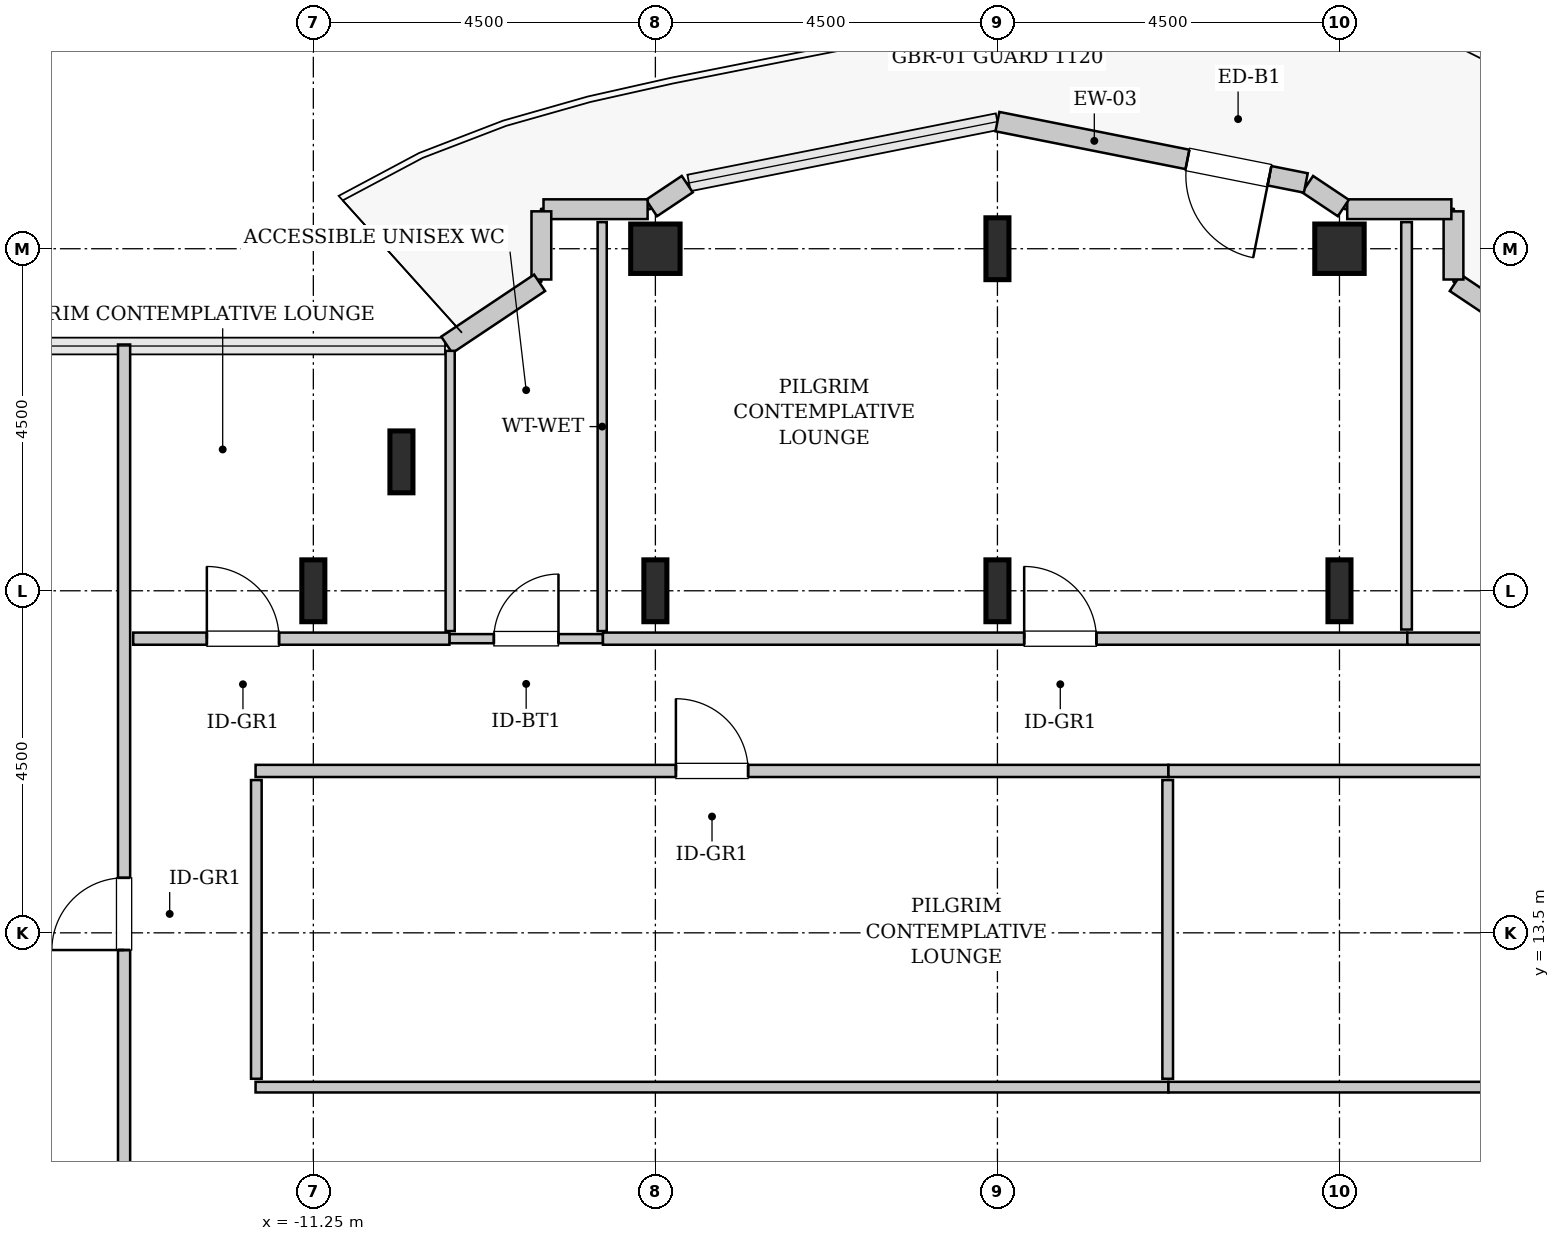
"""IFC4 building model, lengths in metres.
Left out: names, types, materials, properties, quantities, classifications, styles, units other than length and angle.
Written with IfcOpenShell. Run it as: python <this file> out.ifc"""

import sys

from ifc_helpers import new_model, si_unit, direction, frame, frame_2d, origin, origin_2d, place, context, subcontext, project, spatial, rectangle, hollow_rectangle, i_section, extrude, source, transform, mapped, element, fill, save


model = new_model("IFC4")
c1 = context("Model", 3, precision=1e-05, world=origin(), true_north=direction((0.0, 1.0)))
c2 = subcontext(c1, "Body", "Model", "MODEL_VIEW")
j1 = project(units=[si_unit("LENGTHUNIT", "METRE"), si_unit("PLANEANGLEUNIT", "RADIAN")], contexts=[c1])
p1 = place(None, origin())
s1 = spatial("IfcSite", under=j1, at=p1, CompositionType="ELEMENT")
p2 = place(p1, origin())
s2 = spatial("IfcBuilding", under=s1, at=p2, CompositionType="ELEMENT")
p3 = place(p2, frame((0.0, 0.0, 218.0)))
s3 = spatial("IfcBuildingStorey", under=s2, at=p3, CompositionType="ELEMENT", Elevation=218.0)
m1 = source(origin(), c2, "Body", "SweptSolid", [
    extrude(i_section(OverallWidth=0.303, OverallDepth=0.814, WebThickness=0.021, FlangeThickness=0.04, FilletRadius=0.03, at=origin_2d()), origin(), (0.0, 0.0, 1.0), 3.8),
])
for number, where, z_axis, x_axis in (
    (1, (-11.25, 18.0, 0.0), (0.0, 0.0, 1.0), (1.0, 0.0, 0.0)),
    (2, (-10.091, 19.696, 0.0), (0.0, 0.0, 1.0), (1.0, 0.0, 0.0)),
    (3, (-6.75, 18.0, 0.0), (0.0, 0.0, 1.0), (1.0, 0.0, 0.0)),
):
    element("IfcColumn", number, at=place(p3, frame(where, z_axis=z_axis, x_axis=x_axis)), inside=s3, PredefinedType="COLUMN", context=c2, shape_type="MappedRepresentation", body=[
        mapped(m1, transform((0.0, 0.0, 0.0), x_axis=(1.0, 0.0, 0.0), y_axis=(0.0, 1.0, 0.0), z_axis=(0.0, 0.0, 1.0), scale=1.0)),
    ])
m2 = source(origin(), c2, "Body", "SweptSolid", [
    extrude(hollow_rectangle(XDim=0.65, YDim=0.65, WallThickness=0.032, InnerFilletRadius=0.032, OuterFilletRadius=0.064, at=origin_2d()), origin(), (0.0, 0.0, 1.0), 3.8),
])
p4 = place(p3, frame((-6.75, 22.5, 0.0), z_axis=(0.0, 0.0, 1.0), x_axis=(1.0, 0.0, 0.0)))
e4 = element("IfcColumn", 4, at=p4, inside=s3, PredefinedType="COLUMN", context=c2, shape_type="MappedRepresentation", body=[
    mapped(m2, transform((0.0, 0.0, 0.0), x_axis=(1.0, 0.0, 0.0), y_axis=(0.0, 1.0, 0.0), z_axis=(0.0, 0.0, 1.0), scale=1.0)),
])
for number, where, z_axis, x_axis in (
    (5, (-2.25, 18.0, 0.0), (0.0, 0.0, 1.0), (1.0, 0.0, 0.0)),
    (6, (-2.25, 22.5, 0.0), (0.0, 0.0, 1.0), (1.0, 0.0, 0.0)),
    (7, (2.25, 18.0, 0.0), (0.0, 0.0, 1.0), (1.0, 0.0, 0.0)),
):
    element("IfcColumn", number, at=place(p3, frame(where, z_axis=z_axis, x_axis=x_axis)), inside=s3, PredefinedType="COLUMN", context=c2, shape_type="MappedRepresentation", body=[
        mapped(m1, transform((0.0, 0.0, 0.0), x_axis=(1.0, 0.0, 0.0), y_axis=(0.0, 1.0, 0.0), z_axis=(0.0, 0.0, 1.0), scale=1.0)),
    ])
p5 = place(p3, frame((2.25, 22.5, 0.0), z_axis=(0.0, 0.0, 1.0), x_axis=(1.0, 0.0, 0.0)))
e8 = element("IfcColumn", 8, at=p5, inside=s3, PredefinedType="COLUMN", context=c2, shape_type="MappedRepresentation", body=[
    mapped(m2, transform((0.0, 0.0, 0.0), x_axis=(1.0, 0.0, 0.0), y_axis=(0.0, 1.0, 0.0), z_axis=(0.0, 0.0, 1.0), scale=1.0)),
])
m3 = source(origin(), c2, "Body", "SweptSolid", [
    extrude(rectangle(XDim=1.469, YDim=0.26, at=frame_2d((0.734, 0.0))), origin(), (0.0, 0.0, 1.0), 3.55),
])
p6 = place(p3, frame((4.995, 21.236, 0.0), z_axis=(0.0, 0.0, 1.0), x_axis=(-0.831461760506, 0.555581983884, 0.0)))
e9 = element("IfcWall", 9, at=p6, inside=s3, PredefinedType="SOLIDWALL", context=c2, shape_type="MappedRepresentation", body=[
    mapped(m3, transform((0.0, 0.0, 0.0), x_axis=(1.0, 0.0, 0.0), y_axis=(0.0, 1.0, 0.0), z_axis=(0.0, 0.0, 1.0), scale=1.0)),
])
m4 = source(origin(), c2, "Body", "SweptSolid", [
    extrude(rectangle(XDim=0.897, YDim=0.26, at=frame_2d((0.448, 0.0))), origin(), (0.0, 0.0, 1.0), 3.55),
])
p7 = place(p3, frame((3.75, 22.095, 0.0), z_axis=(0.0, 0.0, 1.0), x_axis=(0.0, 1.0, 0.0)))
e10 = element("IfcWall", 10, at=p7, inside=s3, PredefinedType="SOLIDWALL", context=c2, shape_type="MappedRepresentation", body=[
    mapped(m4, transform((0.0, 0.0, 0.0), x_axis=(1.0, 0.0, 0.0), y_axis=(0.0, 1.0, 0.0), z_axis=(0.0, 0.0, 1.0), scale=1.0)),
])
m5 = source(origin(), c2, "Body", "SweptSolid", [
    extrude(rectangle(XDim=1.37, YDim=0.26, at=frame_2d((0.685, 0.0))), origin(), (0.0, 0.0, 1.0), 3.55),
])
p8 = place(p3, frame((3.722, 23.02, 0.0), z_axis=(0.0, 0.0, 1.0), x_axis=(-1.0, 0.0, 0.0)))
e11 = element("IfcWall", 11, at=p8, inside=s3, PredefinedType="SOLIDWALL", context=c2, shape_type="MappedRepresentation", body=[
    mapped(m5, transform((0.0, 0.0, 0.0), x_axis=(1.0, 0.0, 0.0), y_axis=(0.0, 1.0, 0.0), z_axis=(0.0, 0.0, 1.0), scale=1.0)),
])
m6 = source(origin(), c2, "Body", "SweptSolid", [
    extrude(rectangle(XDim=0.565, YDim=0.26, at=frame_2d((0.283, 0.0))), origin(), (0.0, 0.0, 1.0), 3.55),
])
p9 = place(p3, frame((2.301, 23.036, 0.0), z_axis=(0.0, 0.0, 1.0), x_axis=(-0.831651492666, 0.555297933317, 0.0)))
e12 = element("IfcWall", 12, at=p9, inside=s3, PredefinedType="SOLIDWALL", context=c2, shape_type="MappedRepresentation", body=[
    mapped(m6, transform((0.0, 0.0, 0.0), x_axis=(1.0, 0.0, 0.0), y_axis=(0.0, 1.0, 0.0), z_axis=(0.0, 0.0, 1.0), scale=1.0)),
])
m7 = source(origin(), c2, "Body", "SweptSolid", [
    extrude(rectangle(XDim=4.137, YDim=0.26, at=frame_2d((2.068, 0.0))), origin(), (0.0, 0.0, 1.0), 3.55),
])
p10 = place(p3, frame((1.807, 23.365, 0.0), z_axis=(0.0, 0.0, 1.0), x_axis=(-0.980782170794, 0.195105954428, 0.0)))
e13 = element("IfcWall", 13, at=p10, inside=s3, PredefinedType="SOLIDWALL", context=c2, shape_type="MappedRepresentation", body=[
    mapped(m7, transform((0.0, 0.0, 0.0), x_axis=(1.0, 0.0, 0.0), y_axis=(0.0, 1.0, 0.0), z_axis=(0.0, 0.0, 1.0), scale=1.0)),
])
p11 = place(p10, frame((0.488, 0.0, 0.0)))
e14 = element("IfcOpeningElement", 14, at=p11, cuts=e13, PredefinedType="OPENING", context=c2, shape_type="SweptSolid", body=[
    extrude(rectangle(XDim=1.1, YDim=2.2, at=frame_2d((0.55, 1.1))), frame((0.0, 0.14, 0.0), z_axis=(0.0, -1.0, 0.0), x_axis=(1.0, 0.0, 0.0)), (0.0, 0.0, 1.0), 0.28),
])
p12 = place(p3, frame((-6.331, 23.35, 0.0), z_axis=(0.0, 0.0, 1.0), x_axis=(-0.831651492666, -0.555297933317, 0.0)))
e15 = element("IfcWall", 15, at=p12, inside=s3, PredefinedType="SOLIDWALL", context=c2, shape_type="MappedRepresentation", body=[
    mapped(m6, transform((0.0, 0.0, 0.0), x_axis=(1.0, 0.0, 0.0), y_axis=(0.0, 1.0, 0.0), z_axis=(0.0, 0.0, 1.0), scale=1.0)),
])
p13 = place(p3, frame((-6.852, 23.02, 0.0), z_axis=(0.0, 0.0, 1.0), x_axis=(-1.0, 0.0, 0.0)))
e16 = element("IfcWall", 16, at=p13, inside=s3, PredefinedType="SOLIDWALL", context=c2, shape_type="MappedRepresentation", body=[
    mapped(m5, transform((0.0, 0.0, 0.0), x_axis=(1.0, 0.0, 0.0), y_axis=(0.0, 1.0, 0.0), z_axis=(0.0, 0.0, 1.0), scale=1.0)),
])
p14 = place(p3, frame((-8.25, 22.992, 0.0), z_axis=(0.0, 0.0, 1.0), x_axis=(0.0, -1.0, 0.0)))
e17 = element("IfcWall", 17, at=p14, inside=s3, PredefinedType="SOLIDWALL", context=c2, shape_type="MappedRepresentation", body=[
    mapped(m4, transform((0.0, 0.0, 0.0), x_axis=(1.0, 0.0, 0.0), y_axis=(0.0, 1.0, 0.0), z_axis=(0.0, 0.0, 1.0), scale=1.0)),
])
p15 = place(p3, frame((-8.273, 22.052, 0.0), z_axis=(0.0, 0.0, 1.0), x_axis=(-0.831461760506, -0.555581983884, 0.0)))
e18 = element("IfcWall", 18, at=p15, inside=s3, PredefinedType="SOLIDWALL", context=c2, shape_type="MappedRepresentation", body=[
    mapped(m3, transform((0.0, 0.0, 0.0), x_axis=(1.0, 0.0, 0.0), y_axis=(0.0, 1.0, 0.0), z_axis=(0.0, 0.0, 1.0), scale=1.0)),
])
m8 = source(origin(), c2, "Body", "SweptSolid", [
    extrude(rectangle(XDim=2.02, YDim=0.12, at=frame_2d((1.01, 0.0))), origin(), (0.0, 0.0, 1.0), 3.535),
])
p16 = place(p3, frame((-9.46, 17.37, 0.0), z_axis=(0.0, 0.0, 1.0), x_axis=(1.0, 0.0, 0.0)))
e19 = element("IfcWall", 19, at=p16, inside=s3, PredefinedType="PLUMBINGWALL", context=c2, shape_type="MappedRepresentation", body=[
    mapped(m8, transform((0.0, 0.0, 0.0), x_axis=(1.0, 0.0, 0.0), y_axis=(0.0, 1.0, 0.0), z_axis=(0.0, 0.0, 1.0), scale=1.0)),
])
p17 = place(p16, frame((0.585, 0.0, 0.0)))
e20 = element("IfcOpeningElement", 20, at=p17, cuts=e19, PredefinedType="OPENING", context=c2, shape_type="SweptSolid", body=[
    extrude(rectangle(XDim=0.85, YDim=2.1, at=frame_2d((0.425, 1.05))), frame((0.0, 0.07, 0.0), z_axis=(0.0, -1.0, 0.0), x_axis=(1.0, 0.0, 0.0)), (0.0, 0.0, 1.0), 0.14),
])
m9 = source(origin(), c2, "Body", "SweptSolid", [
    extrude(rectangle(XDim=5.38, YDim=0.12, at=frame_2d((2.69, 0.0))), origin(), (0.0, 0.0, 1.0), 3.535),
])
p18 = place(p3, frame((-7.45, 17.47, 0.0), z_axis=(0.0, 0.0, 1.0), x_axis=(0.0, 1.0, 0.0)))
e21 = element("IfcWall", 21, at=p18, inside=s3, PredefinedType="PLUMBINGWALL", context=c2, shape_type="MappedRepresentation", body=[
    mapped(m9, transform((0.0, 0.0, 0.0), x_axis=(1.0, 0.0, 0.0), y_axis=(0.0, 1.0, 0.0), z_axis=(0.0, 0.0, 1.0), scale=1.0)),
])
m10 = source(origin(), c2, "Body", "SweptSolid", [
    extrude(rectangle(XDim=3.687, YDim=0.12, at=frame_2d((1.843, 0.0))), origin(), (0.0, 0.0, 1.0), 3.535),
])
p19 = place(p3, frame((-9.45, 17.47, 0.0), z_axis=(0.0, 0.0, 1.0), x_axis=(0.0, 1.0, 0.0)))
e22 = element("IfcWall", 22, at=p19, inside=s3, PredefinedType="PLUMBINGWALL", context=c2, shape_type="MappedRepresentation", body=[
    mapped(m10, transform((0.0, 0.0, 0.0), x_axis=(1.0, 0.0, 0.0), y_axis=(0.0, 1.0, 0.0), z_axis=(0.0, 0.0, 1.0), scale=1.0)),
])
m11 = source(origin(), c2, "Body", "SweptSolid", [
    extrude(rectangle(XDim=11.153, YDim=0.16, at=frame_2d((5.576, 0.0))), origin(), (0.0, 0.0, 1.0), 3.535),
])
p20 = place(p3, frame((-13.74, 10.087, 0.0), z_axis=(0.0, 0.0, 1.0), x_axis=(0.0, 1.0, 0.0)))
e23 = element("IfcWall", 23, at=p20, inside=s3, PredefinedType="PARTITIONING", context=c2, shape_type="MappedRepresentation", body=[
    mapped(m11, transform((0.0, 0.0, 0.0), x_axis=(1.0, 0.0, 0.0), y_axis=(0.0, 1.0, 0.0), z_axis=(0.0, 0.0, 1.0), scale=1.0)),
])
p21 = place(p20, frame((3.186, 0.0, 0.0)))
e24 = element("IfcOpeningElement", 24, at=p21, cuts=e23, PredefinedType="OPENING", context=c2, shape_type="SweptSolid", body=[
    extrude(rectangle(XDim=0.95, YDim=2.1, at=frame_2d((0.475, 1.05))), frame((0.0, 0.09, 0.0), z_axis=(0.0, -1.0, 0.0), x_axis=(1.0, 0.0, 0.0)), (0.0, 0.0, 1.0), 0.18),
])
m12 = source(origin(), c2, "Body", "SweptSolid", [
    extrude(rectangle(XDim=10.583, YDim=0.16, at=frame_2d((5.291, 0.0))), origin(), (0.0, 0.0, 1.0), 3.535),
])
p22 = place(p3, frame((-7.44, 17.37, 0.0), z_axis=(0.0, 0.0, 1.0), x_axis=(1.0, 0.0, 0.0)))
e25 = element("IfcWall", 25, at=p22, inside=s3, PredefinedType="PARTITIONING", context=c2, shape_type="MappedRepresentation", body=[
    mapped(m12, transform((0.0, 0.0, 0.0), x_axis=(1.0, 0.0, 0.0), y_axis=(0.0, 1.0, 0.0), z_axis=(0.0, 0.0, 1.0), scale=1.0)),
])
p23 = place(p22, frame((5.542, 0.0, 0.0)))
e26 = element("IfcOpeningElement", 26, at=p23, cuts=e25, PredefinedType="OPENING", context=c2, shape_type="SweptSolid", body=[
    extrude(rectangle(XDim=0.95, YDim=2.1, at=frame_2d((0.475, 1.05))), frame((0.0, 0.09, 0.0), z_axis=(0.0, -1.0, 0.0), x_axis=(1.0, 0.0, 0.0)), (0.0, 0.0, 1.0), 0.18),
])
m13 = source(origin(), c2, "Body", "SweptSolid", [
    extrude(rectangle(XDim=5.36, YDim=0.14, at=frame_2d((2.68, 0.0))), origin(), (0.0, 0.0, 1.0), 3.535),
])
p24 = place(p3, frame((3.133, 17.49, 0.0), z_axis=(0.0, 0.0, 1.0), x_axis=(0.0, 1.0, 0.0)))
e27 = element("IfcWall", 27, at=p24, inside=s3, PredefinedType="PARTITIONING", context=c2, shape_type="MappedRepresentation", body=[
    mapped(m13, transform((0.0, 0.0, 0.0), x_axis=(1.0, 0.0, 0.0), y_axis=(0.0, 1.0, 0.0), z_axis=(0.0, 0.0, 1.0), scale=1.0)),
])
m14 = source(origin(), c2, "Body", "SweptSolid", [
    extrude(rectangle(XDim=10.478, YDim=0.16, at=frame_2d((5.239, 0.0))), origin(), (0.0, 0.0, 1.0), 3.535),
])
p25 = place(p3, frame((3.143, 17.37, 0.0), z_axis=(0.0, 0.0, 1.0), x_axis=(1.0, 0.0, 0.0)))
e28 = element("IfcWall", 28, at=p25, inside=s3, PredefinedType="PARTITIONING", context=c2, shape_type="MappedRepresentation", body=[
    mapped(m14, transform((0.0, 0.0, 0.0), x_axis=(1.0, 0.0, 0.0), y_axis=(0.0, 1.0, 0.0), z_axis=(0.0, 0.0, 1.0), scale=1.0)),
])
p26 = place(p25, frame((4.764, 0.0, 0.0)))
e29 = element("IfcOpeningElement", 29, at=p26, cuts=e28, PredefinedType="OPENING", context=c2, shape_type="SweptSolid", body=[
    extrude(rectangle(XDim=0.95, YDim=2.1, at=frame_2d((0.475, 1.05))), frame((0.0, 0.09, 0.0), z_axis=(0.0, -1.0, 0.0), x_axis=(1.0, 0.0, 0.0)), (0.0, 0.0, 1.0), 0.18),
])
m15 = source(origin(), c2, "Body", "SweptSolid", [
    extrude(rectangle(XDim=12.01, YDim=0.16, at=frame_2d((6.005, 0.0))), origin(), (0.0, 0.0, 1.0), 3.535),
])
p27 = place(p3, frame((-12.01, 15.63, 0.0), z_axis=(0.0, 0.0, 1.0), x_axis=(1.0, 0.0, 0.0)))
e30 = element("IfcWall", 30, at=p27, inside=s3, PredefinedType="PARTITIONING", context=c2, shape_type="MappedRepresentation", body=[
    mapped(m15, transform((0.0, 0.0, 0.0), x_axis=(1.0, 0.0, 0.0), y_axis=(0.0, 1.0, 0.0), z_axis=(0.0, 0.0, 1.0), scale=1.0)),
])
p28 = place(p27, frame((5.53, 0.0, 0.0)))
e31 = element("IfcOpeningElement", 31, at=p28, cuts=e30, PredefinedType="OPENING", context=c2, shape_type="SweptSolid", body=[
    extrude(rectangle(XDim=0.95, YDim=2.1, at=frame_2d((0.475, 1.05))), frame((0.0, 0.09, 0.0), z_axis=(0.0, -1.0, 0.0), x_axis=(1.0, 0.0, 0.0)), (0.0, 0.0, 1.0), 0.18),
])
m16 = source(origin(), c2, "Body", "SweptSolid", [
    extrude(rectangle(XDim=12.01, YDim=0.14, at=frame_2d((6.005, 0.0))), origin(), (0.0, 0.0, 1.0), 3.535),
])
p29 = place(p3, frame((-12.01, 11.47, 0.0), z_axis=(0.0, 0.0, 1.0), x_axis=(1.0, 0.0, 0.0)))
e32 = element("IfcWall", 32, at=p29, inside=s3, PredefinedType="PARTITIONING", context=c2, shape_type="MappedRepresentation", body=[
    mapped(m16, transform((0.0, 0.0, 0.0), x_axis=(1.0, 0.0, 0.0), y_axis=(0.0, 1.0, 0.0), z_axis=(0.0, 0.0, 1.0), scale=1.0)),
])
m17 = source(origin(), c2, "Body", "SweptSolid", [
    extrude(rectangle(XDim=3.93, YDim=0.14, at=frame_2d((1.965, 0.0))), origin(), (0.0, 0.0, 1.0), 3.535),
])
for number, where, z_axis, x_axis in (
    (33, (-12.0, 11.58, 0.0), (0.0, 0.0, 1.0), (0.0, 1.0, 0.0)),
    (34, (-0.01, 11.58, 0.0), (0.0, 0.0, 1.0), (0.0, 1.0, 0.0)),
):
    element("IfcWall", number, at=place(p3, frame(where, z_axis=z_axis, x_axis=x_axis)), inside=s3, PredefinedType="PARTITIONING", context=c2, shape_type="MappedRepresentation", body=[
        mapped(m17, transform((0.0, 0.0, 0.0), x_axis=(1.0, 0.0, 0.0), y_axis=(0.0, 1.0, 0.0), z_axis=(0.0, 0.0, 1.0), scale=1.0)),
    ])
p30 = place(p3, frame((0.0, 15.63, 0.0), z_axis=(0.0, 0.0, 1.0), x_axis=(1.0, 0.0, 0.0)))
e35 = element("IfcWall", 35, at=p30, inside=s3, PredefinedType="PARTITIONING", context=c2, shape_type="MappedRepresentation", body=[
    mapped(m15, transform((0.0, 0.0, 0.0), x_axis=(1.0, 0.0, 0.0), y_axis=(0.0, 1.0, 0.0), z_axis=(0.0, 0.0, 1.0), scale=1.0)),
])
p31 = place(p30, frame((5.53, 0.0, 0.0)))
e36 = element("IfcOpeningElement", 36, at=p31, cuts=e35, PredefinedType="OPENING", context=c2, shape_type="SweptSolid", body=[
    extrude(rectangle(XDim=0.95, YDim=2.1, at=frame_2d((0.475, 1.05))), frame((0.0, 0.09, 0.0), z_axis=(0.0, -1.0, 0.0), x_axis=(1.0, 0.0, 0.0)), (0.0, 0.0, 1.0), 0.18),
])
p32 = place(p3, frame((0.0, 11.47, 0.0), z_axis=(0.0, 0.0, 1.0), x_axis=(1.0, 0.0, 0.0)))
e37 = element("IfcWall", 37, at=p32, inside=s3, PredefinedType="PARTITIONING", context=c2, shape_type="MappedRepresentation", body=[
    mapped(m16, transform((0.0, 0.0, 0.0), x_axis=(1.0, 0.0, 0.0), y_axis=(0.0, 1.0, 0.0), z_axis=(0.0, 0.0, 1.0), scale=1.0)),
])
m18 = source(origin(), c2, "Body", "SweptSolid", [
    extrude(rectangle(XDim=4.16, YDim=0.16, at=frame_2d((2.08, 0.0))), origin(), (0.0, 0.0, 1.0), 3.535),
])
p33 = place(p3, frame((-13.62, 17.37, 0.0), z_axis=(0.0, 0.0, 1.0), x_axis=(1.0, 0.0, 0.0)))
e38 = element("IfcWall", 38, at=p33, inside=s3, PredefinedType="PARTITIONING", context=c2, shape_type="MappedRepresentation", body=[
    mapped(m18, transform((0.0, 0.0, 0.0), x_axis=(1.0, 0.0, 0.0), y_axis=(0.0, 1.0, 0.0), z_axis=(0.0, 0.0, 1.0), scale=1.0)),
])
p34 = place(p33, frame((0.969, 0.0, 0.0)))
e39 = element("IfcOpeningElement", 39, at=p34, cuts=e38, PredefinedType="OPENING", context=c2, shape_type="SweptSolid", body=[
    extrude(rectangle(XDim=0.95, YDim=2.1, at=frame_2d((0.475, 1.05))), frame((0.0, 0.09, 0.0), z_axis=(0.0, -1.0, 0.0), x_axis=(1.0, 0.0, 0.0)), (0.0, 0.0, 1.0), 0.18),
])
m19 = source(origin(), c2, "Body", "SweptSolid", [
    extrude(rectangle(XDim=1.1, YDim=2.2, at=frame_2d((0.55, 1.1))), frame((0.0, 0.025, 0.0), z_axis=(0.0, -1.0, 0.0), x_axis=(1.0, 0.0, 0.0)), (0.0, 0.0, 1.0), 0.05),
])
p35 = place(p11, origin())
e40 = element("IfcDoor", 40, at=p35, inside=s3, OperationType="SINGLE_SWING_LEFT", PredefinedType="DOOR", context=c2, shape_type="MappedRepresentation", body=[
    mapped(m19, transform((0.0, 0.0, 0.0), x_axis=(1.0, 0.0, 0.0), y_axis=(0.0, 1.0, 0.0), z_axis=(0.0, 0.0, 1.0), scale=1.0)),
])
fill(e14, e40)
m20 = source(origin(), c2, "Body", "SweptSolid", [
    extrude(rectangle(XDim=0.85, YDim=2.1, at=frame_2d((0.425, 1.05))), frame((0.0, 0.025, 0.0), z_axis=(0.0, -1.0, 0.0), x_axis=(1.0, 0.0, 0.0)), (0.0, 0.0, 1.0), 0.05),
])
p36 = place(p17, origin())
e41 = element("IfcDoor", 41, at=p36, inside=s3, OperationType="SINGLE_SWING_RIGHT", PredefinedType="DOOR", context=c2, shape_type="MappedRepresentation", body=[
    mapped(m20, transform((0.0, 0.0, 0.0), x_axis=(1.0, 0.0, 0.0), y_axis=(0.0, 1.0, 0.0), z_axis=(0.0, 0.0, 1.0), scale=1.0)),
])
fill(e20, e41)
m21 = source(origin(), c2, "Body", "SweptSolid", [
    extrude(rectangle(XDim=0.95, YDim=2.1, at=frame_2d((0.475, 1.05))), frame((0.0, 0.025, 0.0), z_axis=(0.0, -1.0, 0.0), x_axis=(1.0, 0.0, 0.0)), (0.0, 0.0, 1.0), 0.05),
])
p37 = place(p21, origin())
e42 = element("IfcDoor", 42, at=p37, inside=s3, OperationType="SINGLE_SWING_LEFT", PredefinedType="DOOR", context=c2, shape_type="MappedRepresentation", body=[
    mapped(m21, transform((0.0, 0.0, 0.0), x_axis=(1.0, 0.0, 0.0), y_axis=(0.0, 1.0, 0.0), z_axis=(0.0, 0.0, 1.0), scale=1.0)),
])
fill(e24, e42)
p38 = place(p23, origin())
e43 = element("IfcDoor", 43, at=p38, inside=s3, OperationType="SINGLE_SWING_LEFT", PredefinedType="DOOR", context=c2, shape_type="MappedRepresentation", body=[
    mapped(m21, transform((0.0, 0.0, 0.0), x_axis=(1.0, 0.0, 0.0), y_axis=(0.0, 1.0, 0.0), z_axis=(0.0, 0.0, 1.0), scale=1.0)),
])
fill(e26, e43)
p39 = place(p28, origin())
e44 = element("IfcDoor", 44, at=p39, inside=s3, OperationType="SINGLE_SWING_LEFT", PredefinedType="DOOR", context=c2, shape_type="MappedRepresentation", body=[
    mapped(m21, transform((0.0, 0.0, 0.0), x_axis=(1.0, 0.0, 0.0), y_axis=(0.0, 1.0, 0.0), z_axis=(0.0, 0.0, 1.0), scale=1.0)),
])
fill(e31, e44)
p40 = place(p34, origin())
e45 = element("IfcDoor", 45, at=p40, inside=s3, OperationType="SINGLE_SWING_LEFT", PredefinedType="DOOR", context=c2, shape_type="MappedRepresentation", body=[
    mapped(m21, transform((0.0, 0.0, 0.0), x_axis=(1.0, 0.0, 0.0), y_axis=(0.0, 1.0, 0.0), z_axis=(0.0, 0.0, 1.0), scale=1.0)),
])
fill(e39, e45)
save(model, sys.argv[1])
